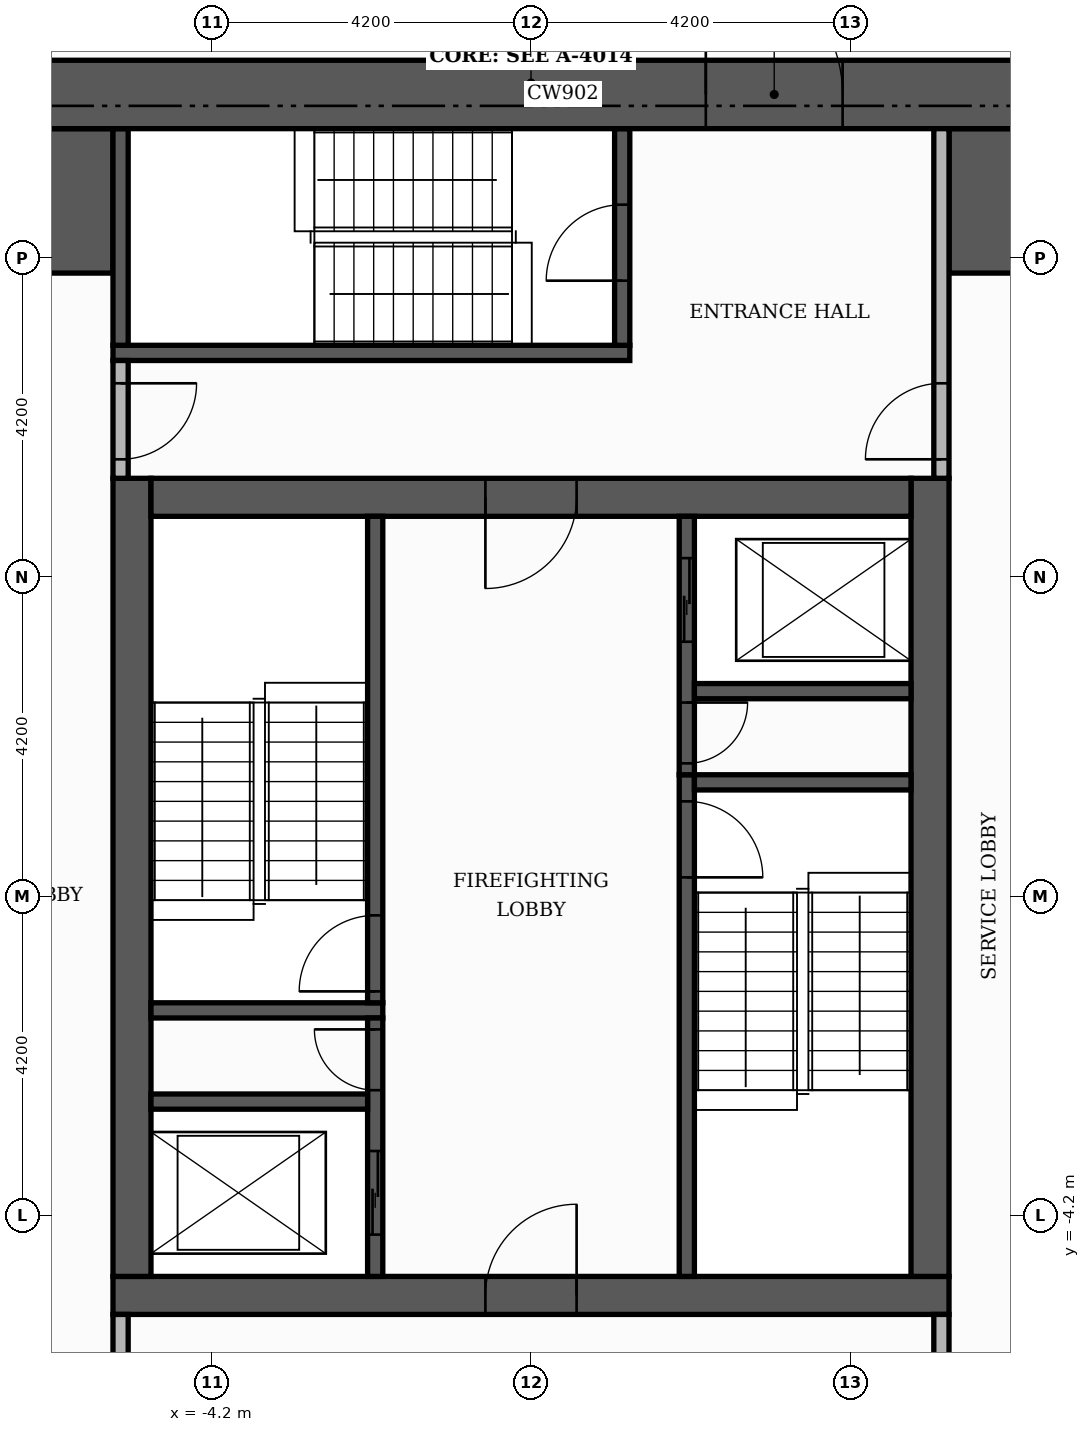
"""IFC4 building model, lengths in metres.
Left out: names, types, materials, properties, quantities, classifications, styles, units other than length and angle.
Written with IfcOpenShell. Run it as: python <this file> out.ifc"""

import sys

from ifc_helpers import new_model, si_unit, direction, frame, frame_2d, origin, place, context, subcontext, project, spatial, rectangle, extrude, element, fill, save


model = new_model("IFC4")
c1 = context("Model", 3, precision=1e-05, world=origin(), true_north=direction((0.0, 1.0)))
c2 = subcontext(c1, "Body", "Model", "MODEL_VIEW")
j1 = project(units=[si_unit("LENGTHUNIT", "METRE"), si_unit("PLANEANGLEUNIT", "RADIAN")], contexts=[c1])
p1 = place(None, origin())
s1 = spatial("IfcSite", under=j1, at=p1, CompositionType="ELEMENT")
p2 = place(p1, origin())
s2 = spatial("IfcBuilding", under=s1, at=p2, CompositionType="ELEMENT")
p3 = place(p2, frame((0.0, 0.0, 87.0)))
s3 = spatial("IfcBuildingStorey", under=s2, at=p3, CompositionType="ELEMENT", Elevation=87.0)
p4 = place(p3, frame((-5.5, -5.25, 0.0), z_axis=(0.0, 0.0, 1.0), x_axis=(1.0, 0.0, 0.0)))
e1 = element("IfcWall", 1, at=p4, inside=s3, PredefinedType="SHEAR", context=c2, shape_type="SweptSolid", body=[
    extrude(rectangle(XDim=11.0, YDim=0.5, at=frame_2d((5.5, 0.0))), origin(), (0.0, 0.0, 1.0), 3.48),
])
p5 = place(p4, frame((4.9, 0.0, 0.0)))
e2 = element("IfcOpeningElement", 2, at=p5, cuts=e1, PredefinedType="OPENING", context=c2, shape_type="SweptSolid", body=[
    extrude(rectangle(XDim=1.2, YDim=2.1, at=frame_2d((0.6, 1.05))), frame((0.0, 0.26, 0.0), z_axis=(0.0, -1.0, 0.0), x_axis=(1.0, 0.0, 0.0)), (0.0, 0.0, 1.0), 0.52),
])
for number, where, z_axis, x_axis in (
    (3, (-5.25, -5.0, 0.0), (0.0, 0.0, 1.0), (0.0, 1.0, 0.0)),
    (4, (5.25, -5.0, 0.0), (0.0, 0.0, 1.0), (0.0, 1.0, 0.0)),
):
    element("IfcWall", number, at=place(p3, frame(where, z_axis=z_axis, x_axis=x_axis)), inside=s3, PredefinedType="SHEAR", context=c2, shape_type="SweptSolid", body=[
        extrude(rectangle(XDim=10.5, YDim=0.5, at=frame_2d((5.25, 0.0))), origin(), (0.0, 0.0, 1.0), 3.48),
    ])
p6 = place(p3, frame((-5.0, 5.25, 0.0), z_axis=(0.0, 0.0, 1.0), x_axis=(1.0, 0.0, 0.0)))
e5 = element("IfcWall", 5, at=p6, inside=s3, PredefinedType="SHEAR", context=c2, shape_type="SweptSolid", body=[
    extrude(rectangle(XDim=10.0, YDim=0.5, at=frame_2d((5.0, 0.0))), origin(), (0.0, 0.0, 1.0), 3.48),
])
p7 = place(p6, frame((4.4, 0.0, 0.0)))
e6 = element("IfcOpeningElement", 6, at=p7, cuts=e5, PredefinedType="OPENING", context=c2, shape_type="SweptSolid", body=[
    extrude(rectangle(XDim=1.2, YDim=2.1, at=frame_2d((0.6, 1.05))), frame((0.0, 0.26, 0.0), z_axis=(0.0, -1.0, 0.0), x_axis=(1.0, 0.0, 0.0)), (0.0, 0.0, 1.0), 0.52),
])
for number, where, z_axis, x_axis in (
    (7, (-10.1, 9.15, 0.0), (0.0, 0.0, 1.0), (1.0, 0.0, 0.0)),
    (8, (5.5, 9.15, 0.0), (0.0, 0.0, 1.0), (1.0, 0.0, 0.0)),
):
    element("IfcWall", number, at=place(p3, frame(where, z_axis=z_axis, x_axis=x_axis)), inside=s3, PredefinedType="SHEAR", context=c2, shape_type="SweptSolid", body=[
        extrude(rectangle(XDim=4.6, YDim=1.9, at=frame_2d((2.3, 0.0))), origin(), (0.0, 0.0, 1.0), 3.48),
    ])
p8 = place(p3, frame((2.05, -5.0, 0.0), z_axis=(0.0, 0.0, 1.0), x_axis=(0.0, 1.0, 0.0)))
e9 = element("IfcWall", 9, at=p8, inside=s3, PredefinedType="SHEAR", context=c2, shape_type="SweptSolid", body=[
    extrude(rectangle(XDim=6.6, YDim=0.2, at=frame_2d((3.3, 0.0))), origin(), (0.0, 0.0, 1.0), 3.48),
])
p9 = place(p8, frame((5.25, 0.0, 0.0)))
e10 = element("IfcOpeningElement", 10, at=p9, cuts=e9, PredefinedType="OPENING", context=c2, shape_type="SweptSolid", body=[
    extrude(rectangle(XDim=1.0, YDim=2.1, at=frame_2d((0.5, 1.05))), frame((0.0, 0.11, 0.0), z_axis=(0.0, -1.0, 0.0), x_axis=(1.0, 0.0, 0.0)), (0.0, 0.0, 1.0), 0.22),
])
p10 = place(p3, frame((-5.0, -1.5, 0.0), z_axis=(0.0, 0.0, 1.0), x_axis=(1.0, 0.0, 0.0)))
e11 = element("IfcWall", 11, at=p10, inside=s3, PredefinedType="SHEAR", context=c2, shape_type="SweptSolid", body=[
    extrude(rectangle(XDim=3.05, YDim=0.2, at=frame_2d((1.525, 0.0))), origin(), (0.0, 0.0, 1.0), 3.48),
])
p11 = place(p3, frame((-2.05, -1.4, 0.0), z_axis=(0.0, 0.0, 1.0), x_axis=(0.0, 1.0, 0.0)))
e12 = element("IfcWall", 12, at=p11, inside=s3, PredefinedType="SHEAR", context=c2, shape_type="SweptSolid", body=[
    extrude(rectangle(XDim=6.4, YDim=0.2, at=frame_2d((3.2, 0.0))), origin(), (0.0, 0.0, 1.0), 3.48),
])
p12 = place(p11, frame((0.15, 0.0, 0.0)))
e13 = element("IfcOpeningElement", 13, at=p12, cuts=e12, PredefinedType="OPENING", context=c2, shape_type="SweptSolid", body=[
    extrude(rectangle(XDim=1.0, YDim=2.1, at=frame_2d((0.5, 1.05))), frame((0.0, 0.11, 0.0), z_axis=(0.0, -1.0, 0.0), x_axis=(1.0, 0.0, 0.0)), (0.0, 0.0, 1.0), 0.22),
])
p13 = place(p3, frame((2.15, 1.5, 0.0), z_axis=(0.0, 0.0, 1.0), x_axis=(1.0, 0.0, 0.0)))
e14 = element("IfcWall", 14, at=p13, inside=s3, PredefinedType="SHEAR", context=c2, shape_type="SweptSolid", body=[
    extrude(rectangle(XDim=2.85, YDim=0.2, at=frame_2d((1.425, 0.0))), origin(), (0.0, 0.0, 1.0), 3.48),
])
p14 = place(p3, frame((-5.5, 7.15, 0.0), z_axis=(0.0, 0.0, 1.0), x_axis=(1.0, 0.0, 0.0)))
e15 = element("IfcWall", 15, at=p14, inside=s3, PredefinedType="SHEAR", context=c2, shape_type="SweptSolid", body=[
    extrude(rectangle(XDim=6.8, YDim=0.2, at=frame_2d((3.4, 0.0))), origin(), (0.0, 0.0, 1.0), 3.48),
])
p15 = place(p3, frame((-5.4, 7.25, 0.0), z_axis=(0.0, 0.0, 1.0), x_axis=(0.0, 1.0, 0.0)))
e16 = element("IfcWall", 16, at=p15, inside=s3, PredefinedType="SHEAR", context=c2, shape_type="SweptSolid", body=[
    extrude(rectangle(XDim=2.85, YDim=0.2, at=frame_2d((1.425, 0.0))), origin(), (0.0, 0.0, 1.0), 3.48),
])
p16 = place(p3, frame((1.2, 7.25, 0.0), z_axis=(0.0, 0.0, 1.0), x_axis=(0.0, 1.0, 0.0)))
e17 = element("IfcWall", 17, at=p16, inside=s3, PredefinedType="SHEAR", context=c2, shape_type="SweptSolid", body=[
    extrude(rectangle(XDim=2.85, YDim=0.2, at=frame_2d((1.425, 0.0))), origin(), (0.0, 0.0, 1.0), 3.48),
])
p17 = place(p16, frame((0.85, 0.0, 0.0)))
e18 = element("IfcOpeningElement", 18, at=p17, cuts=e17, PredefinedType="OPENING", context=c2, shape_type="SweptSolid", body=[
    extrude(rectangle(XDim=1.0, YDim=2.1, at=frame_2d((0.5, 1.05))), frame((0.0, 0.11, 0.0), z_axis=(0.0, -1.0, 0.0), x_axis=(1.0, 0.0, 0.0)), (0.0, 0.0, 1.0), 0.22),
])
p18 = place(p3, frame((-2.05, -5.0, 0.0), z_axis=(0.0, 0.0, 1.0), x_axis=(0.0, 1.0, 0.0)))
e19 = element("IfcWall", 19, at=p18, inside=s3, PredefinedType="SHEAR", context=c2, shape_type="SweptSolid", body=[
    extrude(rectangle(XDim=3.4, YDim=0.2, at=frame_2d((1.7, 0.0))), origin(), (0.0, 0.0, 1.0), 3.48),
])
p19 = place(p18, frame((0.55, 0.0, 0.0)))
e20 = element("IfcOpeningElement", 20, at=p19, cuts=e19, PredefinedType="OPENING", context=c2, shape_type="SweptSolid", body=[
    extrude(rectangle(XDim=1.1, YDim=2.1, at=frame_2d((0.55, 1.05))), frame((0.0, 0.11, 0.0), z_axis=(0.0, -1.0, 0.0), x_axis=(1.0, 0.0, 0.0)), (0.0, 0.0, 1.0), 0.22),
])
p20 = place(p18, frame((2.45, 0.0, 0.0)))
e21 = element("IfcOpeningElement", 21, at=p20, cuts=e19, PredefinedType="OPENING", context=c2, shape_type="SweptSolid", body=[
    extrude(rectangle(XDim=0.8, YDim=2.1, at=frame_2d((0.4, 1.05))), frame((0.0, 0.11, 0.0), z_axis=(0.0, -1.0, 0.0), x_axis=(1.0, 0.0, 0.0)), (0.0, 0.0, 1.0), 0.22),
])
p21 = place(p3, frame((-5.0, -2.7, 0.0), z_axis=(0.0, 0.0, 1.0), x_axis=(1.0, 0.0, 0.0)))
e22 = element("IfcWall", 22, at=p21, inside=s3, PredefinedType="SHEAR", context=c2, shape_type="SweptSolid", body=[
    extrude(rectangle(XDim=2.85, YDim=0.2, at=frame_2d((1.425, 0.0))), origin(), (0.0, 0.0, 1.0), 3.48),
])
p22 = place(p3, frame((2.05, 1.6, 0.0), z_axis=(0.0, 0.0, 1.0), x_axis=(0.0, 1.0, 0.0)))
e23 = element("IfcWall", 23, at=p22, inside=s3, PredefinedType="SHEAR", context=c2, shape_type="SweptSolid", body=[
    extrude(rectangle(XDim=3.4, YDim=0.2, at=frame_2d((1.7, 0.0))), origin(), (0.0, 0.0, 1.0), 3.48),
])
p23 = place(p22, frame((1.75, 0.0, 0.0)))
e24 = element("IfcOpeningElement", 24, at=p23, cuts=e23, PredefinedType="OPENING", context=c2, shape_type="SweptSolid", body=[
    extrude(rectangle(XDim=1.1, YDim=2.1, at=frame_2d((0.55, 1.05))), frame((0.0, 0.11, 0.0), z_axis=(0.0, -1.0, 0.0), x_axis=(1.0, 0.0, 0.0)), (0.0, 0.0, 1.0), 0.22),
])
p24 = place(p22, frame((0.15, 0.0, 0.0)))
e25 = element("IfcOpeningElement", 25, at=p24, cuts=e23, PredefinedType="OPENING", context=c2, shape_type="SweptSolid", body=[
    extrude(rectangle(XDim=0.8, YDim=2.1, at=frame_2d((0.4, 1.05))), frame((0.0, 0.11, 0.0), z_axis=(0.0, -1.0, 0.0), x_axis=(1.0, 0.0, 0.0)), (0.0, 0.0, 1.0), 0.22),
])
p25 = place(p3, frame((2.15, 2.7, 0.0), z_axis=(0.0, 0.0, 1.0), x_axis=(1.0, 0.0, 0.0)))
e26 = element("IfcWall", 26, at=p25, inside=s3, PredefinedType="SHEAR", context=c2, shape_type="SweptSolid", body=[
    extrude(rectangle(XDim=2.85, YDim=0.2, at=frame_2d((1.425, 0.0))), origin(), (0.0, 0.0, 1.0), 3.48),
])
p26 = place(p3, frame((-11.0, 10.55, 0.0), z_axis=(0.0, 0.0, 1.0), x_axis=(1.0, 0.0, 0.0)))
e27 = element("IfcWall", 27, at=p26, inside=s3, PredefinedType="SHEAR", context=c2, shape_type="SweptSolid", body=[
    extrude(rectangle(XDim=22.0, YDim=0.9, at=frame_2d((11.0, 0.0))), origin(), (0.0, 0.0, 1.0), 3.48),
])
p27 = place(p26, frame((13.3, 0.0, 0.0)))
e28 = element("IfcOpeningElement", 28, at=p27, cuts=e27, PredefinedType="OPENING", context=c2, shape_type="SweptSolid", body=[
    extrude(rectangle(XDim=1.8, YDim=2.2, at=frame_2d((0.9, 1.1))), frame((0.0, 0.46, 0.0), z_axis=(0.0, -1.0, 0.0), x_axis=(1.0, 0.0, 0.0)), (0.0, 0.0, 1.0), 0.92),
])
p28 = place(p3, frame((-5.4, -10.1, 0.0), z_axis=(0.0, 0.0, 1.0), x_axis=(0.0, 1.0, 0.0)))
e29 = element("IfcWall", 29, at=p28, inside=s3, PredefinedType="PARTITIONING", context=c2, shape_type="SweptSolid", body=[
    extrude(rectangle(XDim=4.6, YDim=0.2, at=frame_2d((2.3, 0.0))), origin(), (0.0, 0.0, 1.0), 3.48),
])
p29 = place(p28, frame((2.9, 0.0, 0.0)))
e30 = element("IfcOpeningElement", 30, at=p29, cuts=e29, PredefinedType="OPENING", context=c2, shape_type="SweptSolid", body=[
    extrude(rectangle(XDim=1.0, YDim=2.1, at=frame_2d((0.5, 1.05))), frame((0.0, 0.11, 0.0), z_axis=(0.0, -1.0, 0.0), x_axis=(1.0, 0.0, 0.0)), (0.0, 0.0, 1.0), 0.22),
])
p30 = place(p3, frame((5.4, -7.9, 0.0), z_axis=(0.0, 0.0, 1.0), x_axis=(0.0, 1.0, 0.0)))
e31 = element("IfcWall", 31, at=p30, inside=s3, PredefinedType="PARTITIONING", context=c2, shape_type="SweptSolid", body=[
    extrude(rectangle(XDim=2.4, YDim=0.2, at=frame_2d((1.2, 0.0))), origin(), (0.0, 0.0, 1.0), 3.48),
])
p31 = place(p30, frame((0.7, 0.0, 0.0)))
e32 = element("IfcOpeningElement", 32, at=p31, cuts=e31, PredefinedType="OPENING", context=c2, shape_type="SweptSolid", body=[
    extrude(rectangle(XDim=1.0, YDim=2.1, at=frame_2d((0.5, 1.05))), frame((0.0, 0.11, 0.0), z_axis=(0.0, -1.0, 0.0), x_axis=(1.0, 0.0, 0.0)), (0.0, 0.0, 1.0), 0.22),
])
p32 = place(p3, frame((-5.4, 5.5, 0.0), z_axis=(0.0, 0.0, 1.0), x_axis=(0.0, 1.0, 0.0)))
e33 = element("IfcWall", 33, at=p32, inside=s3, PredefinedType="PARTITIONING", context=c2, shape_type="SweptSolid", body=[
    extrude(rectangle(XDim=1.55, YDim=0.2, at=frame_2d((0.775, 0.0))), origin(), (0.0, 0.0, 1.0), 3.48),
])
p33 = place(p32, frame((0.25, 0.0, 0.0)))
e34 = element("IfcOpeningElement", 34, at=p33, cuts=e33, PredefinedType="OPENING", context=c2, shape_type="SweptSolid", body=[
    extrude(rectangle(XDim=1.0, YDim=2.1, at=frame_2d((0.5, 1.05))), frame((0.0, 0.11, 0.0), z_axis=(0.0, -1.0, 0.0), x_axis=(1.0, 0.0, 0.0)), (0.0, 0.0, 1.0), 0.22),
])
p34 = place(p3, frame((5.4, 5.5, 0.0), z_axis=(0.0, 0.0, 1.0), x_axis=(0.0, 1.0, 0.0)))
e35 = element("IfcWall", 35, at=p34, inside=s3, PredefinedType="PARTITIONING", context=c2, shape_type="SweptSolid", body=[
    extrude(rectangle(XDim=4.6, YDim=0.2, at=frame_2d((2.3, 0.0))), origin(), (0.0, 0.0, 1.0), 3.48),
])
p35 = place(p34, frame((0.25, 0.0, 0.0)))
e36 = element("IfcOpeningElement", 36, at=p35, cuts=e35, PredefinedType="OPENING", context=c2, shape_type="SweptSolid", body=[
    extrude(rectangle(XDim=1.0, YDim=2.1, at=frame_2d((0.5, 1.05))), frame((0.0, 0.11, 0.0), z_axis=(0.0, -1.0, 0.0), x_axis=(1.0, 0.0, 0.0)), (0.0, 0.0, 1.0), 0.22),
])
p36 = place(p23, origin())
e37 = element("IfcDoor", 37, at=p36, inside=s3, OperationType="SLIDING_TO_LEFT", PredefinedType="DOOR", context=c2, shape_type="SweptSolid", body=[
    extrude(rectangle(XDim=1.1, YDim=2.1, at=frame_2d((0.55, 1.05))), frame((0.0, 0.025, 0.0), z_axis=(0.0, -1.0, 0.0), x_axis=(1.0, 0.0, 0.0)), (0.0, 0.0, 1.0), 0.05),
])
fill(e24, e37)
p37 = place(p19, origin())
e38 = element("IfcDoor", 38, at=p37, inside=s3, OperationType="SLIDING_TO_LEFT", PredefinedType="DOOR", context=c2, shape_type="SweptSolid", body=[
    extrude(rectangle(XDim=1.1, YDim=2.1, at=frame_2d((0.55, 1.05))), frame((0.0, 0.025, 0.0), z_axis=(0.0, -1.0, 0.0), x_axis=(1.0, 0.0, 0.0)), (0.0, 0.0, 1.0), 0.05),
])
fill(e20, e38)
p38 = place(p12, origin())
e39 = element("IfcDoor", 39, at=p38, inside=s3, OperationType="SINGLE_SWING_LEFT", PredefinedType="DOOR", context=c2, shape_type="SweptSolid", body=[
    extrude(rectangle(XDim=1.0, YDim=2.1, at=frame_2d((0.5, 1.05))), frame((0.0, 0.025, 0.0), z_axis=(0.0, -1.0, 0.0), x_axis=(1.0, 0.0, 0.0)), (0.0, 0.0, 1.0), 0.05),
])
fill(e13, e39)
p39 = place(p9, frame((1.0, 0.0, 0.0), z_axis=(0.0, 0.0, 1.0), x_axis=(-1.0, 0.0, 0.0)))
e40 = element("IfcDoor", 40, at=p39, inside=s3, OperationType="SINGLE_SWING_LEFT", PredefinedType="DOOR", context=c2, shape_type="SweptSolid", body=[
    extrude(rectangle(XDim=1.0, YDim=2.1, at=frame_2d((0.5, 1.05))), frame((0.0, 0.025, 0.0), z_axis=(0.0, -1.0, 0.0), x_axis=(1.0, 0.0, 0.0)), (0.0, 0.0, 1.0), 0.05),
])
fill(e10, e40)
p40 = place(p24, frame((0.8, 0.0, 0.0), z_axis=(0.0, 0.0, 1.0), x_axis=(-1.0, 0.0, 0.0)))
e41 = element("IfcDoor", 41, at=p40, inside=s3, OperationType="SINGLE_SWING_RIGHT", PredefinedType="DOOR", context=c2, shape_type="SweptSolid", body=[
    extrude(rectangle(XDim=0.8, YDim=2.1, at=frame_2d((0.4, 1.05))), frame((0.0, 0.025, 0.0), z_axis=(0.0, -1.0, 0.0), x_axis=(1.0, 0.0, 0.0)), (0.0, 0.0, 1.0), 0.05),
])
fill(e25, e41)
p41 = place(p20, origin())
e42 = element("IfcDoor", 42, at=p41, inside=s3, OperationType="SINGLE_SWING_RIGHT", PredefinedType="DOOR", context=c2, shape_type="SweptSolid", body=[
    extrude(rectangle(XDim=0.8, YDim=2.1, at=frame_2d((0.4, 1.05))), frame((0.0, 0.025, 0.0), z_axis=(0.0, -1.0, 0.0), x_axis=(1.0, 0.0, 0.0)), (0.0, 0.0, 1.0), 0.05),
])
fill(e21, e42)
p42 = place(p7, frame((1.2, 0.0, 0.0), z_axis=(0.0, 0.0, 1.0), x_axis=(-1.0, 0.0, 0.0)))
e43 = element("IfcDoor", 43, at=p42, inside=s3, OperationType="SINGLE_SWING_LEFT", PredefinedType="DOOR", context=c2, shape_type="SweptSolid", body=[
    extrude(rectangle(XDim=1.2, YDim=2.1, at=frame_2d((0.6, 1.05))), frame((0.0, 0.025, 0.0), z_axis=(0.0, -1.0, 0.0), x_axis=(1.0, 0.0, 0.0)), (0.0, 0.0, 1.0), 0.05),
])
fill(e6, e43)
p43 = place(p5, origin())
e44 = element("IfcDoor", 44, at=p43, inside=s3, OperationType="SINGLE_SWING_RIGHT", PredefinedType="DOOR", context=c2, shape_type="SweptSolid", body=[
    extrude(rectangle(XDim=1.2, YDim=2.1, at=frame_2d((0.6, 1.05))), frame((0.0, 0.025, 0.0), z_axis=(0.0, -1.0, 0.0), x_axis=(1.0, 0.0, 0.0)), (0.0, 0.0, 1.0), 0.05),
])
fill(e2, e44)
p44 = place(p17, origin())
e45 = element("IfcDoor", 45, at=p44, inside=s3, OperationType="SINGLE_SWING_LEFT", PredefinedType="DOOR", context=c2, shape_type="SweptSolid", body=[
    extrude(rectangle(XDim=1.0, YDim=2.1, at=frame_2d((0.5, 1.05))), frame((0.0, 0.025, 0.0), z_axis=(0.0, -1.0, 0.0), x_axis=(1.0, 0.0, 0.0)), (0.0, 0.0, 1.0), 0.05),
])
fill(e18, e45)
p45 = place(p33, frame((1.0, 0.0, 0.0), z_axis=(0.0, 0.0, 1.0), x_axis=(-1.0, 0.0, 0.0)))
e46 = element("IfcDoor", 46, at=p45, inside=s3, OperationType="SINGLE_SWING_RIGHT", PredefinedType="DOOR", context=c2, shape_type="SweptSolid", body=[
    extrude(rectangle(XDim=1.0, YDim=2.1, at=frame_2d((0.5, 1.05))), frame((0.0, 0.025, 0.0), z_axis=(0.0, -1.0, 0.0), x_axis=(1.0, 0.0, 0.0)), (0.0, 0.0, 1.0), 0.05),
])
fill(e34, e46)
p46 = place(p35, origin())
e47 = element("IfcDoor", 47, at=p46, inside=s3, OperationType="SINGLE_SWING_LEFT", PredefinedType="DOOR", context=c2, shape_type="SweptSolid", body=[
    extrude(rectangle(XDim=1.0, YDim=2.1, at=frame_2d((0.5, 1.05))), frame((0.0, 0.025, 0.0), z_axis=(0.0, -1.0, 0.0), x_axis=(1.0, 0.0, 0.0)), (0.0, 0.0, 1.0), 0.05),
])
fill(e36, e47)
p47 = place(p27, origin())
e48 = element("IfcDoor", 48, at=p47, inside=s3, OperationType="DOUBLE_DOOR_SINGLE_SWING", PredefinedType="DOOR", context=c2, shape_type="SweptSolid", body=[
    extrude(rectangle(XDim=1.8, YDim=2.2, at=frame_2d((0.9, 1.1))), frame((0.0, 0.025, 0.0), z_axis=(0.0, -1.0, 0.0), x_axis=(1.0, 0.0, 0.0)), (0.0, 0.0, 1.0), 0.05),
])
fill(e28, e48)
save(model, sys.argv[1])
